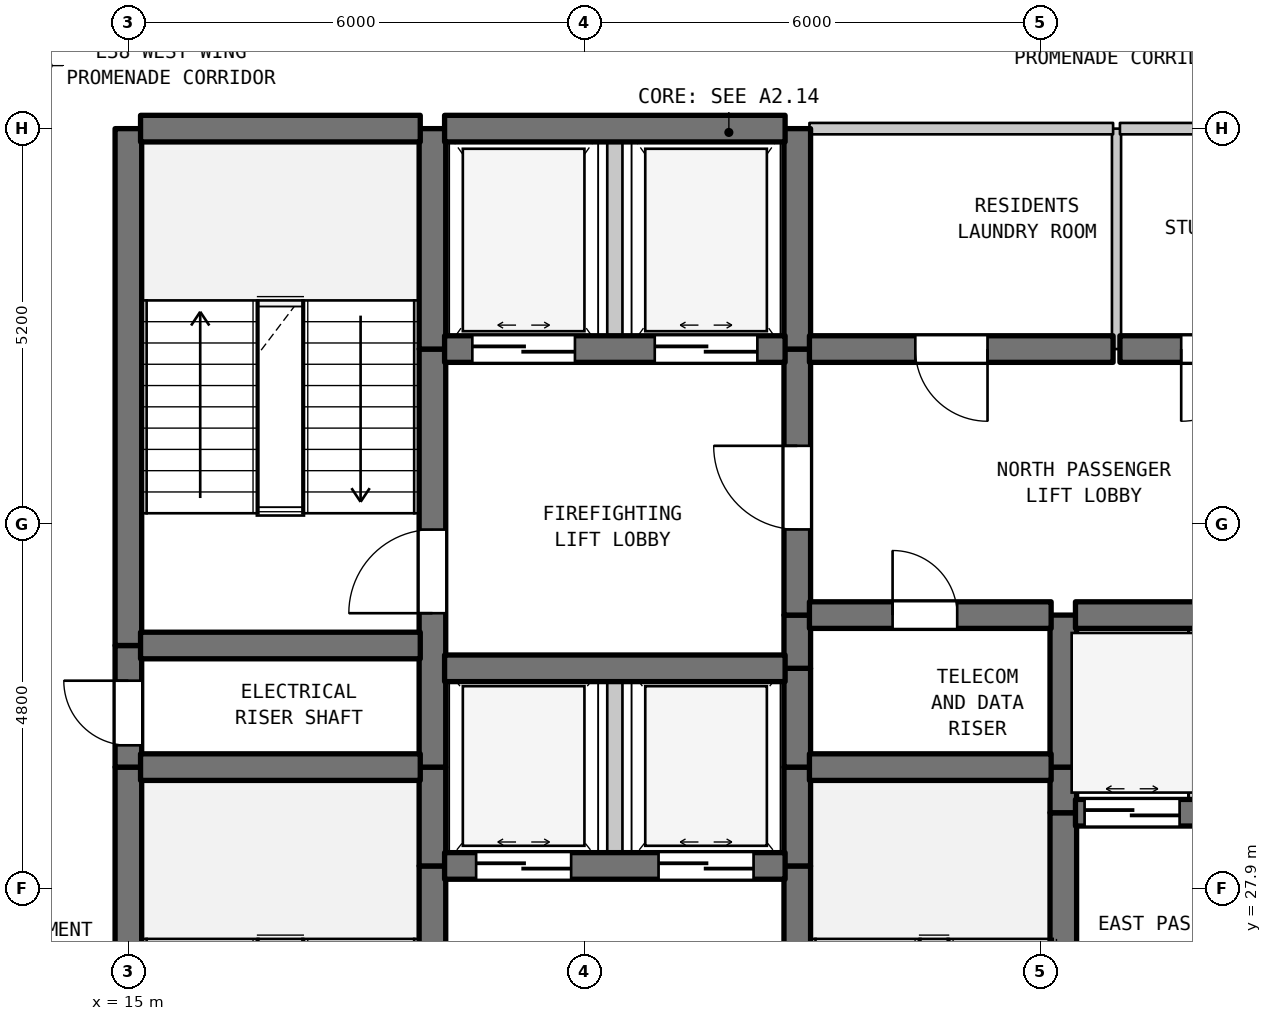
"""IFC4 building model, lengths in metres.
Left out: names, types, materials, properties, quantities, classifications, styles, units other than length and angle.
Written with IfcOpenShell. Run it as: python <this file> out.ifc"""

import sys

from ifc_helpers import new_model, si_unit, direction, frame, frame_2d, origin, place, context, subcontext, project, spatial, rectangle, extrude, element, fill, save


model = new_model("IFC4")
c1 = context("Model", 3, precision=1e-05, world=origin(), true_north=direction((0.0, 1.0)))
c2 = subcontext(c1, "Body", "Model", "MODEL_VIEW")
j1 = project(units=[si_unit("LENGTHUNIT", "METRE"), si_unit("PLANEANGLEUNIT", "RADIAN")], contexts=[c1])
p1 = place(None, origin())
s1 = spatial("IfcSite", under=j1, at=p1, CompositionType="ELEMENT")
p2 = place(p1, origin())
s2 = spatial("IfcBuilding", under=s1, at=p2, CompositionType="ELEMENT")
p3 = place(p2, frame((0.0, 0.0, 155.7)))
s3 = spatial("IfcBuildingStorey", under=s2, at=p3, CompositionType="ELEMENT", Elevation=155.7)
p4 = place(p3, frame((15.0, 22.7, 0.0), z_axis=(0.0, 0.0, 1.0), x_axis=(0.0, 1.0, 0.0)))
e1 = element("IfcWall", 1, at=p4, inside=s3, PredefinedType="SHEAR", context=c2, shape_type="SweptSolid", body=[
    extrude(rectangle(XDim=6.8, YDim=0.35, at=frame_2d((3.4, 0.0))), origin(), (0.0, 0.0, 1.0), 3.28),
])
p5 = place(p3, frame((15.0, 29.5, 0.0), z_axis=(0.0, 0.0, 1.0), x_axis=(0.0, 1.0, 0.0)))
e2 = element("IfcWall", 2, at=p5, inside=s3, PredefinedType="SHEAR", context=c2, shape_type="SweptSolid", body=[
    extrude(rectangle(XDim=1.6, YDim=0.35, at=frame_2d((0.8, 0.0))), origin(), (0.0, 0.0, 1.0), 3.28),
])
p6 = place(p5, frame((0.287, 0.0, 0.0)))
e3 = element("IfcOpeningElement", 3, at=p6, cuts=e2, PredefinedType="OPENING", context=c2, shape_type="SweptSolid", body=[
    extrude(rectangle(XDim=0.85, YDim=2.1, at=frame_2d((0.425, 1.05))), frame((0.0, 0.185, 0.0), z_axis=(0.0, -1.0, 0.0), x_axis=(1.0, 0.0, 0.0)), (0.0, 0.0, 1.0), 0.37),
])
p7 = place(p3, frame((15.0, 31.1, 0.0), z_axis=(0.0, 0.0, 1.0), x_axis=(0.0, 1.0, 0.0)))
e4 = element("IfcWall", 4, at=p7, inside=s3, PredefinedType="SHEAR", context=c2, shape_type="SweptSolid", body=[
    extrude(rectangle(XDim=6.8, YDim=0.35, at=frame_2d((3.4, 0.0))), origin(), (0.0, 0.0, 1.0), 3.28),
])
p8 = place(p3, frame((19.0, 22.7, 0.0), z_axis=(0.0, 0.0, 1.0), x_axis=(0.0, 1.0, 0.0)))
e5 = element("IfcWall", 5, at=p8, inside=s3, PredefinedType="SHEAR", context=c2, shape_type="SweptSolid", body=[
    extrude(rectangle(XDim=5.5, YDim=0.35, at=frame_2d((2.75, 0.0))), origin(), (0.0, 0.0, 1.0), 3.28),
])
p9 = place(p8, frame((0.631, 0.0, 0.0)))
e6 = element("IfcOpeningElement", 6, at=p9, cuts=e5, PredefinedType="OPENING", context=c2, shape_type="SweptSolid", body=[
    extrude(rectangle(XDim=1.1, YDim=2.15, at=frame_2d((0.55, 1.075))), frame((0.0, 0.185, 0.0), z_axis=(0.0, -1.0, 0.0), x_axis=(1.0, 0.0, 0.0)), (0.0, 0.0, 1.0), 0.37),
])
p10 = place(p3, frame((19.0, 28.2, 0.0), z_axis=(0.0, 0.0, 1.0), x_axis=(0.0, 1.0, 0.0)))
e7 = element("IfcWall", 7, at=p10, inside=s3, PredefinedType="SHEAR", context=c2, shape_type="SweptSolid", body=[
    extrude(rectangle(XDim=1.3, YDim=0.35, at=frame_2d((0.65, 0.0))), origin(), (0.0, 0.0, 1.0), 3.28),
])
p11 = place(p3, frame((19.0, 29.5, 0.0), z_axis=(0.0, 0.0, 1.0), x_axis=(0.0, 1.0, 0.0)))
e8 = element("IfcWall", 8, at=p11, inside=s3, PredefinedType="SHEAR", context=c2, shape_type="SweptSolid", body=[
    extrude(rectangle(XDim=5.5, YDim=0.35, at=frame_2d((2.75, 0.0))), origin(), (0.0, 0.0, 1.0), 3.28),
])
p12 = place(p11, frame((2.025, 0.0, 0.0)))
e9 = element("IfcOpeningElement", 9, at=p12, cuts=e8, PredefinedType="OPENING", context=c2, shape_type="SweptSolid", body=[
    extrude(rectangle(XDim=1.1, YDim=2.15, at=frame_2d((0.55, 1.075))), frame((0.0, 0.185, 0.0), z_axis=(0.0, -1.0, 0.0), x_axis=(1.0, 0.0, 0.0)), (0.0, 0.0, 1.0), 0.37),
])
p13 = place(p3, frame((19.0, 35.0, 0.0), z_axis=(0.0, 0.0, 1.0), x_axis=(0.0, 1.0, 0.0)))
e10 = element("IfcWall", 10, at=p13, inside=s3, PredefinedType="SHEAR", context=c2, shape_type="SweptSolid", body=[
    extrude(rectangle(XDim=2.9, YDim=0.35, at=frame_2d((1.45, 0.0))), origin(), (0.0, 0.0, 1.0), 3.28),
])
p14 = place(p3, frame((21.4, 28.2, 0.0), z_axis=(0.0, 0.0, 1.0), x_axis=(0.0, 1.0, 0.0)))
e11 = element("IfcWall", 11, at=p14, inside=s3, PredefinedType="STANDARD", context=c2, shape_type="SweptSolid", body=[
    extrude(rectangle(XDim=2.6, YDim=0.2, at=frame_2d((1.3, 0.0))), origin(), (0.0, 0.0, 1.0), 3.28),
])
p15 = place(p3, frame((21.4, 35.0, 0.0), z_axis=(0.0, 0.0, 1.0), x_axis=(0.0, 1.0, 0.0)))
e12 = element("IfcWall", 12, at=p15, inside=s3, PredefinedType="STANDARD", context=c2, shape_type="SweptSolid", body=[
    extrude(rectangle(XDim=2.9, YDim=0.2, at=frame_2d((1.45, 0.0))), origin(), (0.0, 0.0, 1.0), 3.28),
])
p16 = place(p3, frame((23.8, 22.7, 0.0), z_axis=(0.0, 0.0, 1.0), x_axis=(0.0, 1.0, 0.0)))
e13 = element("IfcWall", 13, at=p16, inside=s3, PredefinedType="SHEAR", context=c2, shape_type="SweptSolid", body=[
    extrude(rectangle(XDim=5.5, YDim=0.35, at=frame_2d((2.75, 0.0))), origin(), (0.0, 0.0, 1.0), 3.28),
])
p17 = place(p16, frame((0.235, 0.0, 0.0)))
e14 = element("IfcOpeningElement", 14, at=p17, cuts=e13, PredefinedType="OPENING", context=c2, shape_type="SweptSolid", body=[
    extrude(rectangle(XDim=1.1, YDim=2.15, at=frame_2d((0.55, 1.075))), frame((0.0, 0.185, 0.0), z_axis=(0.0, -1.0, 0.0), x_axis=(1.0, 0.0, 0.0)), (0.0, 0.0, 1.0), 0.37),
])
for number, where, z_axis, x_axis in (
    (15, (23.8, 28.2, 0.0), (0.0, 0.0, 1.0), (0.0, 1.0, 0.0)),
    (16, (23.8, 29.5, 0.0), (0.0, 0.0, 1.0), (0.0, 1.0, 0.0)),
):
    element("IfcWall", number, at=place(p3, frame(where, z_axis=z_axis, x_axis=x_axis)), inside=s3, PredefinedType="SHEAR", context=c2, shape_type="SweptSolid", body=[
        extrude(rectangle(XDim=1.3, YDim=0.35, at=frame_2d((0.65, 0.0))), origin(), (0.0, 0.0, 1.0), 3.28),
    ])
p18 = place(p3, frame((23.8, 30.8, 0.0), z_axis=(0.0, 0.0, 1.0), x_axis=(0.0, 1.0, 0.0)))
e17 = element("IfcWall", 17, at=p18, inside=s3, PredefinedType="SHEAR", context=c2, shape_type="SweptSolid", body=[
    extrude(rectangle(XDim=0.7, YDim=0.35, at=frame_2d((0.35, 0.0))), origin(), (0.0, 0.0, 1.0), 3.28),
])
p19 = place(p3, frame((23.8, 31.5, 0.0), z_axis=(0.0, 0.0, 1.0), x_axis=(0.0, 1.0, 0.0)))
e18 = element("IfcWall", 18, at=p19, inside=s3, PredefinedType="SHEAR", context=c2, shape_type="SweptSolid", body=[
    extrude(rectangle(XDim=3.5, YDim=0.35, at=frame_2d((1.75, 0.0))), origin(), (0.0, 0.0, 1.0), 3.28),
])
p20 = place(p19, frame((1.127, 0.0, 0.0)))
e19 = element("IfcOpeningElement", 19, at=p20, cuts=e18, PredefinedType="OPENING", context=c2, shape_type="SweptSolid", body=[
    extrude(rectangle(XDim=1.1, YDim=2.15, at=frame_2d((0.55, 1.075))), frame((0.0, 0.185, 0.0), z_axis=(0.0, -1.0, 0.0), x_axis=(1.0, 0.0, 0.0)), (0.0, 0.0, 1.0), 0.37),
])
p21 = place(p3, frame((23.8, 35.0, 0.0), z_axis=(0.0, 0.0, 1.0), x_axis=(0.0, 1.0, 0.0)))
e20 = element("IfcWall", 20, at=p21, inside=s3, PredefinedType="SHEAR", context=c2, shape_type="SweptSolid", body=[
    extrude(rectangle(XDim=2.9, YDim=0.35, at=frame_2d((1.45, 0.0))), origin(), (0.0, 0.0, 1.0), 3.28),
])
p22 = place(p3, frame((27.3, 25.6, 0.0), z_axis=(0.0, 0.0, 1.0), x_axis=(0.0, 1.0, 0.0)))
e21 = element("IfcWall", 21, at=p22, inside=s3, PredefinedType="SHEAR", context=c2, shape_type="SweptSolid", body=[
    extrude(rectangle(XDim=3.3, YDim=0.35, at=frame_2d((1.65, 0.0))), origin(), (0.0, 0.0, 1.0), 3.28),
])
p23 = place(p3, frame((27.3, 28.9, 0.0), z_axis=(0.0, 0.0, 1.0), x_axis=(0.0, 1.0, 0.0)))
e22 = element("IfcWall", 22, at=p23, inside=s3, PredefinedType="SHEAR", context=c2, shape_type="SweptSolid", body=[
    extrude(rectangle(XDim=0.6, YDim=0.35, at=frame_2d((0.3, 0.0))), origin(), (0.0, 0.0, 1.0), 3.28),
])
p24 = place(p3, frame((27.3, 29.5, 0.0), z_axis=(0.0, 0.0, 1.0), x_axis=(0.0, 1.0, 0.0)))
e23 = element("IfcWall", 23, at=p24, inside=s3, PredefinedType="SHEAR", context=c2, shape_type="SweptSolid", body=[
    extrude(rectangle(XDim=2.0, YDim=0.35, at=frame_2d((1.0, 0.0))), origin(), (0.0, 0.0, 1.0), 3.28),
])
p25 = place(p3, frame((28.0, 35.0, 0.0), z_axis=(0.0, 0.0, 1.0), x_axis=(0.0, 1.0, 0.0)))
e24 = element("IfcWall", 24, at=p25, inside=s3, PredefinedType="PARTITIONING", context=c2, shape_type="SweptSolid", body=[
    extrude(rectangle(XDim=2.9, YDim=0.12, at=frame_2d((1.45, 0.0))), origin(), (0.0, 0.0, 1.0), 3.28),
])
p26 = place(p3, frame((29.05, 28.9, 0.0), z_axis=(0.0, 0.0, 1.0), x_axis=(0.0, 1.0, 0.0)))
e25 = element("IfcWall", 25, at=p26, inside=s3, PredefinedType="STANDARD", context=c2, shape_type="SweptSolid", body=[
    extrude(rectangle(XDim=2.6, YDim=0.2, at=frame_2d((1.3, 0.0))), origin(), (0.0, 0.0, 1.0), 3.28),
])
p27 = place(p3, frame((19.16, 28.2, 0.0), z_axis=(0.0, 0.0, 1.0), x_axis=(1.0, 0.0, 0.0)))
e26 = element("IfcWall", 26, at=p27, inside=s3, PredefinedType="SHEAR", context=c2, shape_type="SweptSolid", body=[
    extrude(rectangle(XDim=4.48, YDim=0.35, at=frame_2d((2.24, 0.0))), origin(), (0.0, 0.0, 1.0), 3.28),
])
p28 = place(p27, frame((0.415, 0.0, 0.0)))
e27 = element("IfcOpeningElement", 27, at=p28, cuts=e26, PredefinedType="OPENING", context=c2, shape_type="SweptSolid", body=[
    extrude(rectangle(XDim=1.25, YDim=2.2, at=frame_2d((0.625, 1.1))), frame((0.0, 0.185, 0.0), z_axis=(0.0, -1.0, 0.0), x_axis=(1.0, 0.0, 0.0)), (0.0, 0.0, 1.0), 0.37),
])
p29 = place(p27, frame((2.815, 0.0, 0.0)))
e28 = element("IfcOpeningElement", 28, at=p29, cuts=e26, PredefinedType="OPENING", context=c2, shape_type="SweptSolid", body=[
    extrude(rectangle(XDim=1.25, YDim=2.2, at=frame_2d((0.625, 1.1))), frame((0.0, 0.185, 0.0), z_axis=(0.0, -1.0, 0.0), x_axis=(1.0, 0.0, 0.0)), (0.0, 0.0, 1.0), 0.37),
])
p30 = place(p3, frame((27.46, 28.9, 0.0), z_axis=(0.0, 0.0, 1.0), x_axis=(1.0, 0.0, 0.0)))
e29 = element("IfcWall", 29, at=p30, inside=s3, PredefinedType="SHEAR", context=c2, shape_type="SweptSolid", body=[
    extrude(rectangle(XDim=3.18, YDim=0.35, at=frame_2d((1.59, 0.0))), origin(), (0.0, 0.0, 1.0), 3.28),
])
p31 = place(p30, frame((0.12, 0.0, 0.0)))
e30 = element("IfcOpeningElement", 30, at=p31, cuts=e29, PredefinedType="OPENING", context=c2, shape_type="SweptSolid", body=[
    extrude(rectangle(XDim=1.25, YDim=2.2, at=frame_2d((0.625, 1.1))), frame((0.0, 0.185, 0.0), z_axis=(0.0, -1.0, 0.0), x_axis=(1.0, 0.0, 0.0)), (0.0, 0.0, 1.0), 0.37),
])
p32 = place(p30, frame((1.81, 0.0, 0.0)))
e31 = element("IfcOpeningElement", 31, at=p32, cuts=e29, PredefinedType="OPENING", context=c2, shape_type="SweptSolid", body=[
    extrude(rectangle(XDim=1.25, YDim=2.2, at=frame_2d((0.625, 1.1))), frame((0.0, 0.185, 0.0), z_axis=(0.0, -1.0, 0.0), x_axis=(1.0, 0.0, 0.0)), (0.0, 0.0, 1.0), 0.37),
])
p33 = place(p3, frame((15.16, 29.5, 0.0), z_axis=(0.0, 0.0, 1.0), x_axis=(1.0, 0.0, 0.0)))
e32 = element("IfcWall", 32, at=p33, inside=s3, PredefinedType="SHEAR", context=c2, shape_type="SweptSolid", body=[
    extrude(rectangle(XDim=3.68, YDim=0.35, at=frame_2d((1.84, 0.0))), origin(), (0.0, 0.0, 1.0), 3.28),
])
p34 = place(p3, frame((23.96, 29.5, 0.0), z_axis=(0.0, 0.0, 1.0), x_axis=(1.0, 0.0, 0.0)))
e33 = element("IfcWall", 33, at=p34, inside=s3, PredefinedType="SHEAR", context=c2, shape_type="SweptSolid", body=[
    extrude(rectangle(XDim=3.18, YDim=0.35, at=frame_2d((1.59, 0.0))), origin(), (0.0, 0.0, 1.0), 3.28),
])
p35 = place(p3, frame((19.16, 30.8, 0.0), z_axis=(0.0, 0.0, 1.0), x_axis=(1.0, 0.0, 0.0)))
e34 = element("IfcWall", 34, at=p35, inside=s3, PredefinedType="SHEAR", context=c2, shape_type="SweptSolid", body=[
    extrude(rectangle(XDim=4.48, YDim=0.35, at=frame_2d((2.24, 0.0))), origin(), (0.0, 0.0, 1.0), 3.28),
])
p36 = place(p3, frame((15.16, 31.1, 0.0), z_axis=(0.0, 0.0, 1.0), x_axis=(1.0, 0.0, 0.0)))
e35 = element("IfcWall", 35, at=p36, inside=s3, PredefinedType="SHEAR", context=c2, shape_type="SweptSolid", body=[
    extrude(rectangle(XDim=3.68, YDim=0.35, at=frame_2d((1.84, 0.0))), origin(), (0.0, 0.0, 1.0), 3.28),
])
p37 = place(p3, frame((23.96, 31.5, 0.0), z_axis=(0.0, 0.0, 1.0), x_axis=(1.0, 0.0, 0.0)))
e36 = element("IfcWall", 36, at=p37, inside=s3, PredefinedType="SHEAR", context=c2, shape_type="SweptSolid", body=[
    extrude(rectangle(XDim=3.18, YDim=0.35, at=frame_2d((1.59, 0.0))), origin(), (0.0, 0.0, 1.0), 3.28),
])
p38 = place(p37, frame((1.094, 0.0, 0.0)))
e37 = element("IfcOpeningElement", 37, at=p38, cuts=e36, PredefinedType="OPENING", context=c2, shape_type="SweptSolid", body=[
    extrude(rectangle(XDim=0.85, YDim=2.1, at=frame_2d((0.425, 1.05))), frame((0.0, 0.185, 0.0), z_axis=(0.0, -1.0, 0.0), x_axis=(1.0, 0.0, 0.0)), (0.0, 0.0, 1.0), 0.37),
])
p39 = place(p3, frame((27.46, 31.5, 0.0), z_axis=(0.0, 0.0, 1.0), x_axis=(1.0, 0.0, 0.0)))
e38 = element("IfcWall", 38, at=p39, inside=s3, PredefinedType="SHEAR", context=c2, shape_type="SweptSolid", body=[
    extrude(rectangle(XDim=3.18, YDim=0.35, at=frame_2d((1.59, 0.0))), origin(), (0.0, 0.0, 1.0), 3.28),
])
p40 = place(p3, frame((19.16, 35.0, 0.0), z_axis=(0.0, 0.0, 1.0), x_axis=(1.0, 0.0, 0.0)))
e39 = element("IfcWall", 39, at=p40, inside=s3, PredefinedType="SHEAR", context=c2, shape_type="SweptSolid", body=[
    extrude(rectangle(XDim=4.48, YDim=0.35, at=frame_2d((2.24, 0.0))), origin(), (0.0, 0.0, 1.0), 3.28),
])
p41 = place(p40, frame((0.365, 0.0, 0.0)))
e40 = element("IfcOpeningElement", 40, at=p41, cuts=e39, PredefinedType="OPENING", context=c2, shape_type="SweptSolid", body=[
    extrude(rectangle(XDim=1.35, YDim=2.2, at=frame_2d((0.675, 1.1))), frame((0.0, 0.185, 0.0), z_axis=(0.0, -1.0, 0.0), x_axis=(1.0, 0.0, 0.0)), (0.0, 0.0, 1.0), 0.37),
])
p42 = place(p40, frame((2.765, 0.0, 0.0)))
e41 = element("IfcOpeningElement", 41, at=p42, cuts=e39, PredefinedType="OPENING", context=c2, shape_type="SweptSolid", body=[
    extrude(rectangle(XDim=1.35, YDim=2.2, at=frame_2d((0.675, 1.1))), frame((0.0, 0.185, 0.0), z_axis=(0.0, -1.0, 0.0), x_axis=(1.0, 0.0, 0.0)), (0.0, 0.0, 1.0), 0.37),
])
p43 = place(p3, frame((23.96, 35.0, 0.0), z_axis=(0.0, 0.0, 1.0), x_axis=(1.0, 0.0, 0.0)))
e42 = element("IfcWall", 42, at=p43, inside=s3, PredefinedType="SHEAR", context=c2, shape_type="SweptSolid", body=[
    extrude(rectangle(XDim=3.995, YDim=0.35, at=frame_2d((1.998, 0.0))), origin(), (0.0, 0.0, 1.0), 3.28),
])
p44 = place(p43, frame((1.393, 0.0, 0.0)))
e43 = element("IfcOpeningElement", 43, at=p44, cuts=e42, PredefinedType="OPENING", context=c2, shape_type="SweptSolid", body=[
    extrude(rectangle(XDim=0.95, YDim=2.15, at=frame_2d((0.475, 1.075))), frame((0.0, 0.185, 0.0), z_axis=(0.0, -1.0, 0.0), x_axis=(1.0, 0.0, 0.0)), (0.0, 0.0, 1.0), 0.37),
])
p45 = place(p3, frame((28.045, 35.0, 0.0), z_axis=(0.0, 0.0, 1.0), x_axis=(1.0, 0.0, 0.0)))
e44 = element("IfcWall", 44, at=p45, inside=s3, PredefinedType="SHEAR", context=c2, shape_type="SweptSolid", body=[
    extrude(rectangle(XDim=2.595, YDim=0.35, at=frame_2d((1.297, 0.0))), origin(), (0.0, 0.0, 1.0), 3.28),
])
p46 = place(p45, frame((0.806, 0.0, 0.0)))
e45 = element("IfcOpeningElement", 45, at=p46, cuts=e44, PredefinedType="OPENING", context=c2, shape_type="SweptSolid", body=[
    extrude(rectangle(XDim=0.95, YDim=2.15, at=frame_2d((0.475, 1.075))), frame((0.0, 0.185, 0.0), z_axis=(0.0, -1.0, 0.0), x_axis=(1.0, 0.0, 0.0)), (0.0, 0.0, 1.0), 0.37),
])
p47 = place(p3, frame((15.16, 37.9, 0.0), z_axis=(0.0, 0.0, 1.0), x_axis=(1.0, 0.0, 0.0)))
e46 = element("IfcWall", 46, at=p47, inside=s3, PredefinedType="SHEAR", context=c2, shape_type="SweptSolid", body=[
    extrude(rectangle(XDim=3.68, YDim=0.35, at=frame_2d((1.84, 0.0))), origin(), (0.0, 0.0, 1.0), 3.28),
])
p48 = place(p3, frame((19.16, 37.9, 0.0), z_axis=(0.0, 0.0, 1.0), x_axis=(1.0, 0.0, 0.0)))
e47 = element("IfcWall", 47, at=p48, inside=s3, PredefinedType="SHEAR", context=c2, shape_type="SweptSolid", body=[
    extrude(rectangle(XDim=4.48, YDim=0.35, at=frame_2d((2.24, 0.0))), origin(), (0.0, 0.0, 1.0), 3.28),
])
p49 = place(p3, frame((23.96, 37.9, 0.0), z_axis=(0.0, 0.0, 1.0), x_axis=(1.0, 0.0, 0.0)))
e48 = element("IfcWall", 48, at=p49, inside=s3, PredefinedType="STANDARD", context=c2, shape_type="SweptSolid", body=[
    extrude(rectangle(XDim=3.995, YDim=0.15, at=frame_2d((1.998, 0.0))), origin(), (0.0, 0.0, 1.0), 2.68),
])
p50 = place(p3, frame((28.045, 37.9, 0.0), z_axis=(0.0, 0.0, 1.0), x_axis=(1.0, 0.0, 0.0)))
e49 = element("IfcWall", 49, at=p50, inside=s3, PredefinedType="STANDARD", context=c2, shape_type="SweptSolid", body=[
    extrude(rectangle(XDim=2.695, YDim=0.15, at=frame_2d((1.348, 0.0))), origin(), (0.0, 0.0, 1.0), 2.68),
])
p51 = place(p6, origin())
e50 = element("IfcDoor", 50, at=p51, inside=s3, OperationType="SINGLE_SWING_RIGHT", PredefinedType="DOOR", context=c2, shape_type="SweptSolid", body=[
    extrude(rectangle(XDim=0.85, YDim=2.1, at=frame_2d((0.425, 1.05))), frame((0.0, 0.025, 0.0), z_axis=(0.0, -1.0, 0.0), x_axis=(1.0, 0.0, 0.0)), (0.0, 0.0, 1.0), 0.05),
])
fill(e3, e50)
p52 = place(p12, origin())
e51 = element("IfcDoor", 51, at=p52, inside=s3, OperationType="SINGLE_SWING_LEFT", PredefinedType="DOOR", context=c2, shape_type="SweptSolid", body=[
    extrude(rectangle(XDim=1.1, YDim=2.15, at=frame_2d((0.55, 1.075))), frame((0.0, 0.025, 0.0), z_axis=(0.0, -1.0, 0.0), x_axis=(1.0, 0.0, 0.0)), (0.0, 0.0, 1.0), 0.05),
])
fill(e9, e51)
p53 = place(p20, origin())
e52 = element("IfcDoor", 52, at=p53, inside=s3, OperationType="SINGLE_SWING_RIGHT", PredefinedType="DOOR", context=c2, shape_type="SweptSolid", body=[
    extrude(rectangle(XDim=1.1, YDim=2.15, at=frame_2d((0.55, 1.075))), frame((0.0, 0.025, 0.0), z_axis=(0.0, -1.0, 0.0), x_axis=(1.0, 0.0, 0.0)), (0.0, 0.0, 1.0), 0.05),
])
fill(e19, e52)
p54 = place(p28, origin())
e53 = element("IfcDoor", 53, at=p54, inside=s3, OperationType="DOUBLE_DOOR_SLIDING", PredefinedType="DOOR", context=c2, shape_type="SweptSolid", body=[
    extrude(rectangle(XDim=1.25, YDim=2.2, at=frame_2d((0.625, 1.1))), frame((0.0, 0.025, 0.0), z_axis=(0.0, -1.0, 0.0), x_axis=(1.0, 0.0, 0.0)), (0.0, 0.0, 1.0), 0.05),
])
fill(e27, e53)
p55 = place(p29, origin())
e54 = element("IfcDoor", 54, at=p55, inside=s3, OperationType="DOUBLE_DOOR_SLIDING", PredefinedType="DOOR", context=c2, shape_type="SweptSolid", body=[
    extrude(rectangle(XDim=1.25, YDim=2.2, at=frame_2d((0.625, 1.1))), frame((0.0, 0.025, 0.0), z_axis=(0.0, -1.0, 0.0), x_axis=(1.0, 0.0, 0.0)), (0.0, 0.0, 1.0), 0.05),
])
fill(e28, e54)
p56 = place(p31, origin())
e55 = element("IfcDoor", 55, at=p56, inside=s3, OperationType="DOUBLE_DOOR_SLIDING", PredefinedType="DOOR", context=c2, shape_type="SweptSolid", body=[
    extrude(rectangle(XDim=1.25, YDim=2.2, at=frame_2d((0.625, 1.1))), frame((0.0, 0.025, 0.0), z_axis=(0.0, -1.0, 0.0), x_axis=(1.0, 0.0, 0.0)), (0.0, 0.0, 1.0), 0.05),
])
fill(e30, e55)
p57 = place(p38, origin())
e56 = element("IfcDoor", 56, at=p57, inside=s3, OperationType="SINGLE_SWING_LEFT", PredefinedType="DOOR", context=c2, shape_type="SweptSolid", body=[
    extrude(rectangle(XDim=0.85, YDim=2.1, at=frame_2d((0.425, 1.05))), frame((0.0, 0.025, 0.0), z_axis=(0.0, -1.0, 0.0), x_axis=(1.0, 0.0, 0.0)), (0.0, 0.0, 1.0), 0.05),
])
fill(e37, e56)
p58 = place(p41, origin())
e57 = element("IfcDoor", 57, at=p58, inside=s3, OperationType="DOUBLE_DOOR_SLIDING", PredefinedType="DOOR", context=c2, shape_type="SweptSolid", body=[
    extrude(rectangle(XDim=1.35, YDim=2.2, at=frame_2d((0.675, 1.1))), frame((0.0, 0.025, 0.0), z_axis=(0.0, -1.0, 0.0), x_axis=(1.0, 0.0, 0.0)), (0.0, 0.0, 1.0), 0.05),
])
fill(e40, e57)
p59 = place(p42, origin())
e58 = element("IfcDoor", 58, at=p59, inside=s3, OperationType="DOUBLE_DOOR_SLIDING", PredefinedType="DOOR", context=c2, shape_type="SweptSolid", body=[
    extrude(rectangle(XDim=1.35, YDim=2.2, at=frame_2d((0.675, 1.1))), frame((0.0, 0.025, 0.0), z_axis=(0.0, -1.0, 0.0), x_axis=(1.0, 0.0, 0.0)), (0.0, 0.0, 1.0), 0.05),
])
fill(e41, e58)
p60 = place(p44, frame((0.95, 0.0, 0.0), z_axis=(0.0, 0.0, 1.0), x_axis=(-1.0, 0.0, 0.0)))
e59 = element("IfcDoor", 59, at=p60, inside=s3, OperationType="SINGLE_SWING_RIGHT", PredefinedType="DOOR", context=c2, shape_type="SweptSolid", body=[
    extrude(rectangle(XDim=0.95, YDim=2.15, at=frame_2d((0.475, 1.075))), frame((0.0, 0.025, 0.0), z_axis=(0.0, -1.0, 0.0), x_axis=(1.0, 0.0, 0.0)), (0.0, 0.0, 1.0), 0.05),
])
fill(e43, e59)
p61 = place(p46, frame((0.95, 0.0, 0.0), z_axis=(0.0, 0.0, 1.0), x_axis=(-1.0, 0.0, 0.0)))
e60 = element("IfcDoor", 60, at=p61, inside=s3, OperationType="SINGLE_SWING_LEFT", PredefinedType="DOOR", context=c2, shape_type="SweptSolid", body=[
    extrude(rectangle(XDim=0.95, YDim=2.15, at=frame_2d((0.475, 1.075))), frame((0.0, 0.025, 0.0), z_axis=(0.0, -1.0, 0.0), x_axis=(1.0, 0.0, 0.0)), (0.0, 0.0, 1.0), 0.05),
])
fill(e45, e60)
save(model, sys.argv[1])
